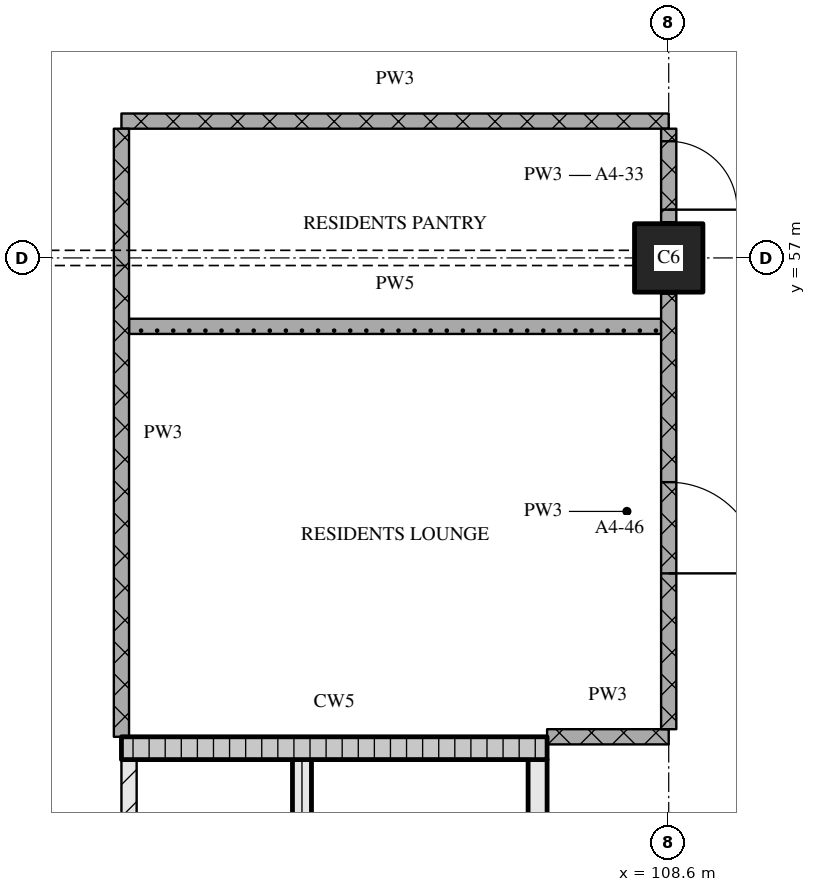
"""IFC4 building model, lengths in metres.
Left out: names, types, materials, properties, quantities, classifications, styles, units other than length and angle.
Written with IfcOpenShell. Run it as: python <this file> out.ifc"""

import sys

from ifc_helpers import new_model, si_unit, direction, frame, frame_2d, origin, origin_2d, place, context, subcontext, project, spatial, rectangle, extrude, element, fill, save


model = new_model("IFC4")
c1 = context("Model", 3, precision=1e-05, world=origin(), true_north=direction((0.0, 1.0)))
c2 = subcontext(c1, "Body", "Model", "MODEL_VIEW")
j1 = project(units=[si_unit("LENGTHUNIT", "METRE"), si_unit("PLANEANGLEUNIT", "RADIAN")], contexts=[c1])
p1 = place(None, origin())
s1 = spatial("IfcSite", under=j1, at=p1, CompositionType="ELEMENT")
p2 = place(p1, origin())
s2 = spatial("IfcBuilding", under=s1, at=p2, CompositionType="ELEMENT")
p3 = place(p2, frame((0.0, 0.0, 69.6)))
s3 = spatial("IfcBuildingStorey", under=s2, at=p3, CompositionType="ELEMENT", Elevation=69.6)
p4 = place(p3, frame((108.6, 57.0, 0.0), z_axis=(0.0, 0.0, 1.0), x_axis=(1.0, 0.0, 0.0)))
e1 = element("IfcColumn", 1, at=p4, inside=s3, PredefinedType="COLUMN", context=c2, shape_type="SweptSolid", body=[
    extrude(rectangle(XDim=0.9, YDim=0.9, at=origin_2d()), origin(), (0.0, 0.0, 1.0), 3.6),
])
p5 = place(p3, frame((101.5, 43.5, 0.0), z_axis=(0.0, 0.0, 1.0), x_axis=(0.0, 1.0, 0.0)))
e2 = element("IfcWall", 2, at=p5, inside=s3, PredefinedType="PARTITIONING", context=c2, shape_type="SweptSolid", body=[
    extrude(rectangle(XDim=6.9, YDim=0.2, at=frame_2d((3.45, 0.0))), origin(), (0.0, 0.0, 1.0), 3.32),
])
p6 = place(p5, frame((1.0, 0.0, 0.0)))
e3 = element("IfcOpeningElement", 3, at=p6, cuts=e2, PredefinedType="OPENING", context=c2, shape_type="SweptSolid", body=[
    extrude(rectangle(XDim=1.0, YDim=2.1, at=frame_2d((0.5, 1.05))), frame((0.0, 0.11, 0.0), z_axis=(0.0, -1.0, 0.0), x_axis=(1.0, 0.0, 0.0)), (0.0, 0.0, 1.0), 0.22),
])
p7 = place(p3, frame((103.775, 43.5, 0.0), z_axis=(0.0, 0.0, 1.0), x_axis=(0.0, 1.0, 0.0)))
e4 = element("IfcWall", 4, at=p7, inside=s3, PredefinedType="SOLIDWALL", context=c2, shape_type="SweptSolid", body=[
    extrude(rectangle(XDim=6.9, YDim=0.25, at=frame_2d((3.45, 0.0))), origin(), (0.0, 0.0, 1.0), 3.32),
])
p8 = place(p7, frame((0.2, 0.0, 0.0)))
e5 = element("IfcOpeningElement", 5, at=p8, cuts=e4, PredefinedType="OPENING", context=c2, shape_type="SweptSolid", body=[
    extrude(rectangle(XDim=1.0, YDim=2.1, at=frame_2d((0.5, 1.05))), frame((0.0, 0.135, 0.0), z_axis=(0.0, -1.0, 0.0), x_axis=(1.0, 0.0, 0.0)), (0.0, 0.0, 1.0), 0.27),
])
p9 = place(p3, frame((106.875, 43.5, 0.0), z_axis=(0.0, 0.0, 1.0), x_axis=(0.0, 1.0, 0.0)))
e6 = element("IfcWall", 6, at=p9, inside=s3, PredefinedType="SOLIDWALL", context=c2, shape_type="SweptSolid", body=[
    extrude(rectangle(XDim=6.9, YDim=0.25, at=frame_2d((3.45, 0.0))), origin(), (0.0, 0.0, 1.0), 3.32),
])
p10 = place(p3, frame((101.4, 50.55, 0.0), z_axis=(0.0, 0.0, 1.0), x_axis=(1.0, 0.0, 0.0)))
e7 = element("IfcWall", 7, at=p10, inside=s3, PredefinedType="SOLIDWALL", context=c2, shape_type="SweptSolid", body=[
    extrude(rectangle(XDim=5.6, YDim=0.3, at=frame_2d((2.8, 0.0))), origin(), (0.0, 0.0, 1.0), 3.32),
])
p11 = place(p3, frame((107.0, 50.7, 0.0), z_axis=(0.0, 0.0, 1.0), x_axis=(1.0, 0.0, 0.0)))
e8 = element("IfcWall", 8, at=p11, inside=s3, PredefinedType="PARTITIONING", context=c2, shape_type="SweptSolid", body=[
    extrude(rectangle(XDim=1.6, YDim=0.2, at=frame_2d((0.8, 0.0))), origin(), (0.0, 0.0, 1.0), 3.32),
])
p12 = place(p3, frame((101.5, 56.1, 0.0), z_axis=(0.0, 0.0, 1.0), x_axis=(1.0, 0.0, 0.0)))
e9 = element("IfcWall", 9, at=p12, inside=s3, PredefinedType="PARTITIONING", context=c2, shape_type="SweptSolid", body=[
    extrude(rectangle(XDim=7.0, YDim=0.2, at=frame_2d((3.5, 0.0))), origin(), (0.0, 0.0, 1.0), 3.32),
])
p13 = place(p3, frame((101.4, 58.8, 0.0), z_axis=(0.0, 0.0, 1.0), x_axis=(1.0, 0.0, 0.0)))
e10 = element("IfcWall", 10, at=p13, inside=s3, PredefinedType="PARTITIONING", context=c2, shape_type="SweptSolid", body=[
    extrude(rectangle(XDim=7.2, YDim=0.2, at=frame_2d((3.6, 0.0))), origin(), (0.0, 0.0, 1.0), 3.32),
])
p14 = place(p3, frame((101.4, 58.7, 0.0), z_axis=(0.0, 0.0, 1.0), x_axis=(0.0, -1.0, 0.0)))
e11 = element("IfcWall", 11, at=p14, inside=s3, PredefinedType="PARTITIONING", context=c2, shape_type="SweptSolid", body=[
    extrude(rectangle(XDim=8.0, YDim=0.2, at=frame_2d((4.0, 0.0))), origin(), (0.0, 0.0, 1.0), 3.32),
])
p15 = place(p3, frame((108.6, 50.8, 0.0), z_axis=(0.0, 0.0, 1.0), x_axis=(0.0, 1.0, 0.0)))
e12 = element("IfcWall", 12, at=p15, inside=s3, PredefinedType="PARTITIONING", context=c2, shape_type="SweptSolid", body=[
    extrude(rectangle(XDim=5.73, YDim=0.2, at=frame_2d((2.865, 0.0))), origin(), (0.0, 0.0, 1.0), 3.32),
])
p16 = place(p15, frame((2.05, 0.0, 0.0)))
e13 = element("IfcOpeningElement", 13, at=p16, cuts=e12, PredefinedType="OPENING", context=c2, shape_type="SweptSolid", body=[
    extrude(rectangle(XDim=1.2, YDim=2.1, at=frame_2d((0.6, 1.05))), frame((0.0, 0.11, 0.0), z_axis=(0.0, -1.0, 0.0), x_axis=(1.0, 0.0, 0.0)), (0.0, 0.0, 1.0), 0.22),
])
p17 = place(p3, frame((108.6, 57.47, 0.0), z_axis=(0.0, 0.0, 1.0), x_axis=(0.0, 1.0, 0.0)))
e14 = element("IfcWall", 14, at=p17, inside=s3, PredefinedType="PARTITIONING", context=c2, shape_type="SweptSolid", body=[
    extrude(rectangle(XDim=1.23, YDim=0.2, at=frame_2d((0.615, 0.0))), origin(), (0.0, 0.0, 1.0), 3.32),
])
p18 = place(p17, frame((0.165, 0.0, 0.0)))
e15 = element("IfcOpeningElement", 15, at=p18, cuts=e14, PredefinedType="OPENING", context=c2, shape_type="SweptSolid", body=[
    extrude(rectangle(XDim=0.9, YDim=2.1, at=frame_2d((0.45, 1.05))), frame((0.0, 0.11, 0.0), z_axis=(0.0, -1.0, 0.0), x_axis=(1.0, 0.0, 0.0)), (0.0, 0.0, 1.0), 0.22),
])
p19 = place(p16, origin())
e16 = element("IfcDoor", 16, at=p19, inside=s3, OperationType="SINGLE_SWING_RIGHT", PredefinedType="DOOR", context=c2, shape_type="SweptSolid", body=[
    extrude(rectangle(XDim=1.2, YDim=2.1, at=frame_2d((0.6, 1.05))), frame((0.0, 0.025, 0.0), z_axis=(0.0, -1.0, 0.0), x_axis=(1.0, 0.0, 0.0)), (0.0, 0.0, 1.0), 0.05),
])
fill(e13, e16)
p20 = place(p18, origin())
e17 = element("IfcDoor", 17, at=p20, inside=s3, OperationType="SINGLE_SWING_RIGHT", PredefinedType="DOOR", context=c2, shape_type="SweptSolid", body=[
    extrude(rectangle(XDim=0.9, YDim=2.1, at=frame_2d((0.45, 1.05))), frame((0.0, 0.025, 0.0), z_axis=(0.0, -1.0, 0.0), x_axis=(1.0, 0.0, 0.0)), (0.0, 0.0, 1.0), 0.05),
])
fill(e15, e17)
save(model, sys.argv[1])
